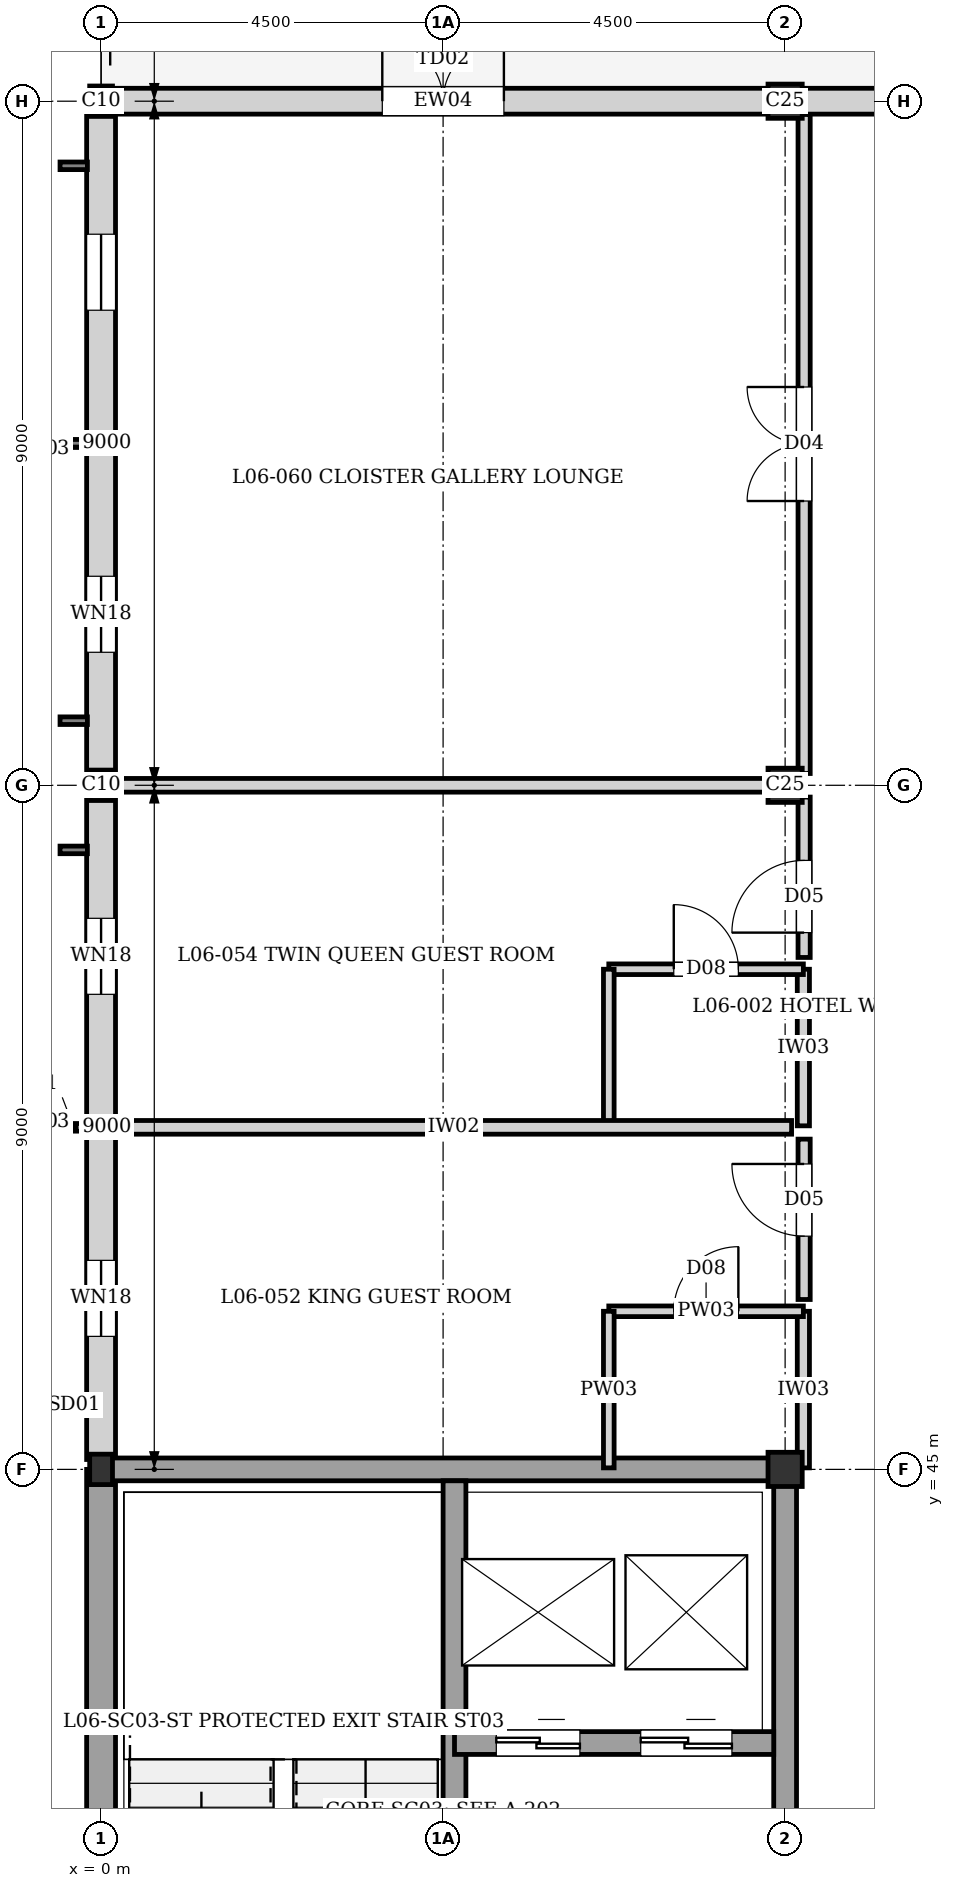
"""IFC4 building model, lengths in metres.
Left out: names, types, materials, properties, quantities, classifications, styles, units other than length and angle.
Written with IfcOpenShell. Run it as: python <this file> out.ifc"""

import sys

from ifc_helpers import new_model, si_unit, direction, frame, frame_2d, origin, origin_2d, place, context, subcontext, project, spatial, rectangle, i_section, extrude, element, fill, save


model = new_model("IFC4")
c1 = context("Model", 3, precision=1e-05, world=origin(), true_north=direction((0.0, 1.0)))
c2 = subcontext(c1, "Body", "Model", "MODEL_VIEW")
j1 = project(units=[si_unit("LENGTHUNIT", "METRE"), si_unit("PLANEANGLEUNIT", "RADIAN")], contexts=[c1])
p1 = place(None, origin())
s1 = spatial("IfcSite", under=j1, at=p1, CompositionType="ELEMENT")
p2 = place(p1, origin())
s2 = spatial("IfcBuilding", under=s1, at=p2, CompositionType="ELEMENT")
p3 = place(p2, frame((0.0, 0.0, 20.64)))
s3 = spatial("IfcBuildingStorey", under=s2, at=p3, CompositionType="ELEMENT", Elevation=20.64)
for number, where, z_axis, x_axis in (
    (1, (0.0, 45.0, 0.0), (0.0, 0.0, 1.0), (1.0, 0.0, 0.0)),
    (2, (0.0, 54.0, 0.0), (0.0, 0.0, 1.0), (1.0, 0.0, 0.0)),
    (3, (0.0, 63.0, 0.0), (0.0, 0.0, 1.0), (1.0, 0.0, 0.0)),
):
    element("IfcColumn", number, at=place(p3, frame(where, z_axis=z_axis, x_axis=x_axis)), inside=s3, PredefinedType="COLUMN", context=c2, shape_type="SweptSolid", body=[
        extrude(i_section(OverallWidth=0.3, OverallDepth=0.4, WebThickness=0.013, FlangeThickness=0.024, at=origin_2d()), origin(), (0.0, 0.0, 1.0), 3.04),
    ])
for number, where, z_axis, x_axis in (
    (4, (9.0, 45.0, 0.0), (0.0, 0.0, 1.0), (1.0, 0.0, 0.0)),
    (5, (9.0, 54.0, 0.0), (0.0, 0.0, 1.0), (1.0, 0.0, 0.0)),
    (6, (9.0, 63.0, 0.0), (0.0, 0.0, 1.0), (1.0, 0.0, 0.0)),
):
    element("IfcColumn", number, at=place(p3, frame(where, z_axis=z_axis, x_axis=x_axis)), inside=s3, PredefinedType="COLUMN", context=c2, shape_type="SweptSolid", body=[
        extrude(rectangle(XDim=0.45, YDim=0.45, at=origin_2d()), origin(), (0.0, 0.0, 1.0), 3.04),
    ])
p4 = place(p3, frame((0.0, 36.0, 0.0), z_axis=(0.0, 0.0, 1.0), x_axis=(0.0, 1.0, 0.0)))
e7 = element("IfcWall", 7, at=p4, inside=s3, PredefinedType="SOLIDWALL", context=c2, shape_type="SweptSolid", body=[
    extrude(rectangle(XDim=9.0, YDim=0.38, at=frame_2d((4.5, 0.0))), origin(), (0.0, 0.0, 1.0), 2.82),
])
p5 = place(p3, frame((0.0, 45.13, 0.0), z_axis=(0.0, 0.0, 1.0), x_axis=(0.0, 1.0, 0.0)))
e8 = element("IfcWall", 8, at=p5, inside=s3, PredefinedType="SOLIDWALL", context=c2, shape_type="SweptSolid", body=[
    extrude(rectangle(XDim=8.87, YDim=0.38, at=frame_2d((4.435, 0.0))), origin(), (0.0, 0.0, 1.0), 2.42),
])
p6 = place(p5, frame((1.62, 0.0, 0.35)))
e9 = element("IfcOpeningElement", 9, at=p6, cuts=e8, PredefinedType="OPENING", context=c2, shape_type="SweptSolid", body=[
    extrude(rectangle(XDim=1.0, YDim=1.6, at=frame_2d((0.5, 0.8))), frame((0.0, 0.2, 0.0), z_axis=(0.0, -1.0, 0.0), x_axis=(1.0, 0.0, 0.0)), (0.0, 0.0, 1.0), 0.4),
])
p7 = place(p5, frame((6.12, 0.0, 0.35)))
e10 = element("IfcOpeningElement", 10, at=p7, cuts=e8, PredefinedType="OPENING", context=c2, shape_type="SweptSolid", body=[
    extrude(rectangle(XDim=1.0, YDim=1.6, at=frame_2d((0.5, 0.8))), frame((0.0, 0.2, 0.0), z_axis=(0.0, -1.0, 0.0), x_axis=(1.0, 0.0, 0.0)), (0.0, 0.0, 1.0), 0.4),
])
p8 = place(p3, frame((0.0, 54.0, 0.0), z_axis=(0.0, 0.0, 1.0), x_axis=(0.0, 1.0, 0.0)))
e11 = element("IfcWall", 11, at=p8, inside=s3, PredefinedType="SOLIDWALL", context=c2, shape_type="SweptSolid", body=[
    extrude(rectangle(XDim=8.845, YDim=0.38, at=frame_2d((4.422, 0.0))), origin(), (0.0, 0.0, 1.0), 2.38),
])
p9 = place(p8, frame((1.75, 0.0, 0.35)))
e12 = element("IfcOpeningElement", 12, at=p9, cuts=e11, PredefinedType="OPENING", context=c2, shape_type="SweptSolid", body=[
    extrude(rectangle(XDim=1.0, YDim=1.6, at=frame_2d((0.5, 0.8))), frame((0.0, 0.2, 0.0), z_axis=(0.0, -1.0, 0.0), x_axis=(1.0, 0.0, 0.0)), (0.0, 0.0, 1.0), 0.4),
])
p10 = place(p8, frame((6.25, 0.0, 0.35)))
e13 = element("IfcOpeningElement", 13, at=p10, cuts=e11, PredefinedType="OPENING", context=c2, shape_type="SweptSolid", body=[
    extrude(rectangle(XDim=1.0, YDim=1.6, at=frame_2d((0.5, 0.8))), frame((0.0, 0.2, 0.0), z_axis=(0.0, -1.0, 0.0), x_axis=(1.0, 0.0, 0.0)), (0.0, 0.0, 1.0), 0.4),
])
p11 = place(p3, frame((0.0, 63.0, 0.0), z_axis=(0.0, 0.0, 1.0), x_axis=(1.0, 0.0, 0.0)))
e14 = element("IfcWall", 14, at=p11, inside=s3, PredefinedType="SOLIDWALL", context=c2, shape_type="SweptSolid", body=[
    extrude(rectangle(XDim=9.0, YDim=0.34, at=frame_2d((4.5, 0.0))), origin(), (0.0, 0.0, 1.0), 2.55),
])
p12 = place(p11, frame((3.7, 0.0, 0.0)))
e15 = element("IfcOpeningElement", 15, at=p12, cuts=e14, PredefinedType="OPENING", context=c2, shape_type="SweptSolid", body=[
    extrude(rectangle(XDim=1.6, YDim=2.25, at=frame_2d((0.8, 1.125))), frame((0.0, 0.18, 0.0), z_axis=(0.0, -1.0, 0.0), x_axis=(1.0, 0.0, 0.0)), (0.0, 0.0, 1.0), 0.36),
])
p13 = place(p3, frame((9.0, 63.0, 0.0), z_axis=(0.0, 0.0, 1.0), x_axis=(1.0, 0.0, 0.0)))
e16 = element("IfcWall", 16, at=p13, inside=s3, PredefinedType="SOLIDWALL", context=c2, shape_type="SweptSolid", body=[
    extrude(rectangle(XDim=9.0, YDim=0.34, at=frame_2d((4.5, 0.0))), origin(), (0.0, 0.0, 1.0), 2.48),
])
p14 = place(p13, frame((1.75, 0.0, 0.35)))
e17 = element("IfcOpeningElement", 17, at=p14, cuts=e16, PredefinedType="OPENING", context=c2, shape_type="SweptSolid", body=[
    extrude(rectangle(XDim=1.0, YDim=1.6, at=frame_2d((0.5, 0.8))), frame((0.0, 0.18, 0.0), z_axis=(0.0, -1.0, 0.0), x_axis=(1.0, 0.0, 0.0)), (0.0, 0.0, 1.0), 0.36),
])
p15 = place(p13, frame((6.25, 0.0, 0.35)))
e18 = element("IfcOpeningElement", 18, at=p15, cuts=e16, PredefinedType="OPENING", context=c2, shape_type="SweptSolid", body=[
    extrude(rectangle(XDim=1.0, YDim=1.6, at=frame_2d((0.5, 0.8))), frame((0.0, 0.18, 0.0), z_axis=(0.0, -1.0, 0.0), x_axis=(1.0, 0.0, 0.0)), (0.0, 0.0, 1.0), 0.36),
])
p16 = place(p3, frame((9.0, 36.0, 0.0), z_axis=(0.0, 0.0, 1.0), x_axis=(0.0, 1.0, 0.0)))
e19 = element("IfcWall", 19, at=p16, inside=s3, PredefinedType="SHEAR", context=c2, shape_type="SweptSolid", body=[
    extrude(rectangle(XDim=9.0, YDim=0.3, at=frame_2d((4.5, 0.0))), origin(), (0.0, 0.0, 1.0), 2.82),
])
p17 = place(p16, frame((2.05, 0.0, 0.0)))
e20 = element("IfcOpeningElement", 20, at=p17, cuts=e19, PredefinedType="OPENING", context=c2, shape_type="SweptSolid", body=[
    extrude(rectangle(XDim=1.4, YDim=2.02, at=frame_2d((0.7, 1.01))), frame((0.0, 0.16, 0.0), z_axis=(0.0, -1.0, 0.0), x_axis=(1.0, 0.0, 0.0)), (0.0, 0.0, 1.0), 0.32),
])
p18 = place(p3, frame((0.0, 45.0, 0.0), z_axis=(0.0, 0.0, 1.0), x_axis=(1.0, 0.0, 0.0)))
e21 = element("IfcWall", 21, at=p18, inside=s3, PredefinedType="SHEAR", context=c2, shape_type="SweptSolid", body=[
    extrude(rectangle(XDim=9.0, YDim=0.3, at=frame_2d((4.5, 0.0))), origin(), (0.0, 0.0, 1.0), 2.82),
])
p19 = place(p3, frame((4.65, 36.15, 0.0), z_axis=(0.0, 0.0, 1.0), x_axis=(0.0, 1.0, 0.0)))
e22 = element("IfcWall", 22, at=p19, inside=s3, PredefinedType="SHEAR", context=c2, shape_type="SweptSolid", body=[
    extrude(rectangle(XDim=8.7, YDim=0.3, at=frame_2d((4.35, 0.0))), origin(), (0.0, 0.0, 1.0), 2.82),
])
p20 = place(p19, frame((0.35, 0.0, 0.0)))
e23 = element("IfcOpeningElement", 23, at=p20, cuts=e22, PredefinedType="OPENING", context=c2, shape_type="SweptSolid", body=[
    extrude(rectangle(XDim=1.4, YDim=2.02, at=frame_2d((0.7, 1.01))), frame((0.0, 0.16, 0.0), z_axis=(0.0, -1.0, 0.0), x_axis=(1.0, 0.0, 0.0)), (0.0, 0.0, 1.0), 0.32),
])
p21 = place(p3, frame((4.65, 41.4, 0.0), z_axis=(0.0, 0.0, 1.0), x_axis=(1.0, 0.0, 0.0)))
e24 = element("IfcWall", 24, at=p21, inside=s3, PredefinedType="SHEAR", context=c2, shape_type="SweptSolid", body=[
    extrude(rectangle(XDim=4.2, YDim=0.3, at=frame_2d((2.1, 0.0))), origin(), (0.0, 0.0, 1.0), 2.82),
])
p22 = place(p21, frame((0.55, 0.0, 0.0)))
e25 = element("IfcOpeningElement", 25, at=p22, cuts=e24, PredefinedType="OPENING", context=c2, shape_type="SweptSolid", body=[
    extrude(rectangle(XDim=1.1, YDim=2.1, at=frame_2d((0.55, 1.05))), frame((0.0, 0.16, 0.0), z_axis=(0.0, -1.0, 0.0), x_axis=(1.0, 0.0, 0.0)), (0.0, 0.0, 1.0), 0.32),
])
p23 = place(p21, frame((2.45, 0.0, 0.0)))
e26 = element("IfcOpeningElement", 26, at=p23, cuts=e24, PredefinedType="OPENING", context=c2, shape_type="SweptSolid", body=[
    extrude(rectangle(XDim=1.2, YDim=2.2, at=frame_2d((0.6, 1.1))), frame((0.0, 0.16, 0.0), z_axis=(0.0, -1.0, 0.0), x_axis=(1.0, 0.0, 0.0)), (0.0, 0.0, 1.0), 0.32),
])
p24 = place(p3, frame((9.24, 45.02, 0.0), z_axis=(0.0, 0.0, 1.0), x_axis=(0.0, 1.0, 0.0)))
e27 = element("IfcWall", 27, at=p24, inside=s3, PredefinedType="PARTITIONING", context=c2, shape_type="SweptSolid", body=[
    extrude(rectangle(XDim=2.06, YDim=0.16, at=frame_2d((1.03, 0.0))), origin(), (0.0, 0.0, 1.0), 2.82),
])
p25 = place(p3, frame((6.68, 47.08, 0.0), z_axis=(0.0, 0.0, 1.0), x_axis=(1.0, 0.0, 0.0)))
e28 = element("IfcWall", 28, at=p25, inside=s3, PredefinedType="PLUMBINGWALL", context=c2, shape_type="SweptSolid", body=[
    extrude(rectangle(XDim=2.56, YDim=0.14, at=frame_2d((1.28, 0.0))), origin(), (0.0, 0.0, 1.0), 2.82),
])
p26 = place(p25, frame((0.855, 0.0, 0.0)))
e29 = element("IfcOpeningElement", 29, at=p26, cuts=e28, PredefinedType="OPENING", context=c2, shape_type="SweptSolid", body=[
    extrude(rectangle(XDim=0.85, YDim=2.04, at=frame_2d((0.425, 1.02))), frame((0.0, 0.08, 0.0), z_axis=(0.0, -1.0, 0.0), x_axis=(1.0, 0.0, 0.0)), (0.0, 0.0, 1.0), 0.16),
])
p27 = place(p3, frame((6.68, 45.02, 0.0), z_axis=(0.0, 0.0, 1.0), x_axis=(0.0, 1.0, 0.0)))
e30 = element("IfcWall", 30, at=p27, inside=s3, PredefinedType="PLUMBINGWALL", context=c2, shape_type="SweptSolid", body=[
    extrude(rectangle(XDim=2.06, YDim=0.14, at=frame_2d((1.03, 0.0))), origin(), (0.0, 0.0, 1.0), 2.82),
])
p28 = place(p3, frame((9.24, 49.52, 0.0), z_axis=(0.0, 0.0, 1.0), x_axis=(0.0, 1.0, 0.0)))
e31 = element("IfcWall", 31, at=p28, inside=s3, PredefinedType="PARTITIONING", context=c2, shape_type="SweptSolid", body=[
    extrude(rectangle(XDim=2.06, YDim=0.16, at=frame_2d((1.03, 0.0))), origin(), (0.0, 0.0, 1.0), 2.82),
])
p29 = place(p3, frame((6.68, 51.58, 0.0), z_axis=(0.0, 0.0, 1.0), x_axis=(1.0, 0.0, 0.0)))
e32 = element("IfcWall", 32, at=p29, inside=s3, PredefinedType="PLUMBINGWALL", context=c2, shape_type="SweptSolid", body=[
    extrude(rectangle(XDim=2.56, YDim=0.14, at=frame_2d((1.28, 0.0))), origin(), (0.0, 0.0, 1.0), 2.82),
])
p30 = place(p29, frame((0.855, 0.0, 0.0)))
e33 = element("IfcOpeningElement", 33, at=p30, cuts=e32, PredefinedType="OPENING", context=c2, shape_type="SweptSolid", body=[
    extrude(rectangle(XDim=0.85, YDim=2.04, at=frame_2d((0.425, 1.02))), frame((0.0, 0.08, 0.0), z_axis=(0.0, -1.0, 0.0), x_axis=(1.0, 0.0, 0.0)), (0.0, 0.0, 1.0), 0.16),
])
p31 = place(p3, frame((6.68, 49.52, 0.0), z_axis=(0.0, 0.0, 1.0), x_axis=(0.0, 1.0, 0.0)))
e34 = element("IfcWall", 34, at=p31, inside=s3, PredefinedType="PLUMBINGWALL", context=c2, shape_type="SweptSolid", body=[
    extrude(rectangle(XDim=2.06, YDim=0.14, at=frame_2d((1.03, 0.0))), origin(), (0.0, 0.0, 1.0), 2.82),
])
p32 = place(p3, frame((0.195, 49.5, 0.0), z_axis=(0.0, 0.0, 1.0), x_axis=(1.0, 0.0, 0.0)))
e35 = element("IfcWall", 35, at=p32, inside=s3, PredefinedType="PARTITIONING", context=c2, shape_type="SweptSolid", body=[
    extrude(rectangle(XDim=8.89, YDim=0.18, at=frame_2d((4.445, 0.0))), origin(), (0.0, 0.0, 1.0), 2.82),
])
p33 = place(p3, frame((0.195, 54.0, 0.0), z_axis=(0.0, 0.0, 1.0), x_axis=(1.0, 0.0, 0.0)))
e36 = element("IfcWall", 36, at=p33, inside=s3, PredefinedType="PARTITIONING", context=c2, shape_type="SweptSolid", body=[
    extrude(rectangle(XDim=9.065, YDim=0.18, at=frame_2d((4.532, 0.0))), origin(), (0.0, 0.0, 1.0), 2.33),
])
p34 = place(p3, frame((9.25, 47.235, 0.0), z_axis=(0.0, 0.0, 1.0), x_axis=(0.0, 1.0, 0.0)))
e37 = element("IfcWall", 37, at=p34, inside=s3, PredefinedType="PARTITIONING", context=c2, shape_type="SweptSolid", body=[
    extrude(rectangle(XDim=2.11, YDim=0.16, at=frame_2d((1.055, 0.0))), origin(), (0.0, 0.0, 1.0), 2.82),
])
p35 = place(p34, frame((0.833, 0.0, 0.0)))
e38 = element("IfcOpeningElement", 38, at=p35, cuts=e37, PredefinedType="OPENING", context=c2, shape_type="SweptSolid", body=[
    extrude(rectangle(XDim=0.95, YDim=2.15, at=frame_2d((0.475, 1.075))), frame((0.0, 0.09, 0.0), z_axis=(0.0, -1.0, 0.0), x_axis=(1.0, 0.0, 0.0)), (0.0, 0.0, 1.0), 0.18),
])
p36 = place(p3, frame((9.25, 51.735, 0.0), z_axis=(0.0, 0.0, 1.0), x_axis=(0.0, 1.0, 0.0)))
e39 = element("IfcWall", 39, at=p36, inside=s3, PredefinedType="PARTITIONING", context=c2, shape_type="SweptSolid", body=[
    extrude(rectangle(XDim=2.11, YDim=0.16, at=frame_2d((1.055, 0.0))), origin(), (0.0, 0.0, 1.0), 2.82),
])
p37 = place(p36, frame((0.327, 0.0, 0.0)))
e40 = element("IfcOpeningElement", 40, at=p37, cuts=e39, PredefinedType="OPENING", context=c2, shape_type="SweptSolid", body=[
    extrude(rectangle(XDim=0.95, YDim=2.15, at=frame_2d((0.475, 1.075))), frame((0.0, 0.09, 0.0), z_axis=(0.0, -1.0, 0.0), x_axis=(1.0, 0.0, 0.0)), (0.0, 0.0, 1.0), 0.18),
])
p38 = place(p3, frame((9.25, 54.155, 0.0), z_axis=(0.0, 0.0, 1.0), x_axis=(0.0, 1.0, 0.0)))
e41 = element("IfcWall", 41, at=p38, inside=s3, PredefinedType="PARTITIONING", context=c2, shape_type="SweptSolid", body=[
    extrude(rectangle(XDim=8.67, YDim=0.16, at=frame_2d((4.335, 0.0))), origin(), (0.0, 0.0, 1.0), 2.82),
])
p39 = place(p38, frame((3.585, 0.0, 0.0)))
e42 = element("IfcOpeningElement", 42, at=p39, cuts=e41, PredefinedType="OPENING", context=c2, shape_type="SweptSolid", body=[
    extrude(rectangle(XDim=1.5, YDim=2.1, at=frame_2d((0.75, 1.05))), frame((0.0, 0.09, 0.0), z_axis=(0.0, -1.0, 0.0), x_axis=(1.0, 0.0, 0.0)), (0.0, 0.0, 1.0), 0.18),
])
p40 = place(p6, origin())
e43 = element("IfcWindow", 43, at=p40, inside=s3, PartitioningType="SINGLE_PANEL", PredefinedType="WINDOW", context=c2, shape_type="SweptSolid", body=[
    extrude(rectangle(XDim=1.0, YDim=1.6, at=frame_2d((0.5, 0.8))), frame((0.0, 0.03, 0.0), z_axis=(0.0, -1.0, 0.0), x_axis=(1.0, 0.0, 0.0)), (0.0, 0.0, 1.0), 0.06),
])
fill(e9, e43)
p41 = place(p7, origin())
e44 = element("IfcWindow", 44, at=p41, inside=s3, PartitioningType="SINGLE_PANEL", PredefinedType="WINDOW", context=c2, shape_type="SweptSolid", body=[
    extrude(rectangle(XDim=1.0, YDim=1.6, at=frame_2d((0.5, 0.8))), frame((0.0, 0.03, 0.0), z_axis=(0.0, -1.0, 0.0), x_axis=(1.0, 0.0, 0.0)), (0.0, 0.0, 1.0), 0.06),
])
fill(e10, e44)
p42 = place(p9, origin())
e45 = element("IfcWindow", 45, at=p42, inside=s3, PartitioningType="SINGLE_PANEL", PredefinedType="WINDOW", context=c2, shape_type="SweptSolid", body=[
    extrude(rectangle(XDim=1.0, YDim=1.6, at=frame_2d((0.5, 0.8))), frame((0.0, 0.03, 0.0), z_axis=(0.0, -1.0, 0.0), x_axis=(1.0, 0.0, 0.0)), (0.0, 0.0, 1.0), 0.06),
])
fill(e12, e45)
p43 = place(p10, origin())
e46 = element("IfcWindow", 46, at=p43, inside=s3, PartitioningType="SINGLE_PANEL", PredefinedType="WINDOW", context=c2, shape_type="SweptSolid", body=[
    extrude(rectangle(XDim=1.0, YDim=1.6, at=frame_2d((0.5, 0.8))), frame((0.0, 0.03, 0.0), z_axis=(0.0, -1.0, 0.0), x_axis=(1.0, 0.0, 0.0)), (0.0, 0.0, 1.0), 0.06),
])
fill(e13, e46)
p44 = place(p12, origin())
e47 = element("IfcDoor", 47, at=p44, inside=s3, OperationType="DOUBLE_DOOR_SINGLE_SWING", PredefinedType="DOOR", context=c2, shape_type="SweptSolid", body=[
    extrude(rectangle(XDim=1.6, YDim=2.25, at=frame_2d((0.8, 1.125))), frame((0.0, 0.025, 0.0), z_axis=(0.0, -1.0, 0.0), x_axis=(1.0, 0.0, 0.0)), (0.0, 0.0, 1.0), 0.05),
])
fill(e15, e47)
p45 = place(p22, origin())
e48 = element("IfcDoor", 48, at=p45, inside=s3, OperationType="DOUBLE_DOOR_SLIDING", PredefinedType="DOOR", context=c2, shape_type="SweptSolid", body=[
    extrude(rectangle(XDim=1.1, YDim=2.1, at=frame_2d((0.55, 1.05))), frame((0.0, 0.025, 0.0), z_axis=(0.0, -1.0, 0.0), x_axis=(1.0, 0.0, 0.0)), (0.0, 0.0, 1.0), 0.05),
])
fill(e25, e48)
p46 = place(p23, origin())
e49 = element("IfcDoor", 49, at=p46, inside=s3, OperationType="DOUBLE_DOOR_SLIDING", PredefinedType="DOOR", context=c2, shape_type="SweptSolid", body=[
    extrude(rectangle(XDim=1.2, YDim=2.2, at=frame_2d((0.6, 1.1))), frame((0.0, 0.025, 0.0), z_axis=(0.0, -1.0, 0.0), x_axis=(1.0, 0.0, 0.0)), (0.0, 0.0, 1.0), 0.05),
])
fill(e26, e49)
p47 = place(p26, origin())
e50 = element("IfcDoor", 50, at=p47, inside=s3, OperationType="SINGLE_SWING_RIGHT", PredefinedType="DOOR", context=c2, shape_type="SweptSolid", body=[
    extrude(rectangle(XDim=0.85, YDim=2.04, at=frame_2d((0.425, 1.02))), frame((0.0, 0.025, 0.0), z_axis=(0.0, -1.0, 0.0), x_axis=(1.0, 0.0, 0.0)), (0.0, 0.0, 1.0), 0.05),
])
fill(e29, e50)
p48 = place(p30, origin())
e51 = element("IfcDoor", 51, at=p48, inside=s3, OperationType="SINGLE_SWING_LEFT", PredefinedType="DOOR", context=c2, shape_type="SweptSolid", body=[
    extrude(rectangle(XDim=0.85, YDim=2.04, at=frame_2d((0.425, 1.02))), frame((0.0, 0.025, 0.0), z_axis=(0.0, -1.0, 0.0), x_axis=(1.0, 0.0, 0.0)), (0.0, 0.0, 1.0), 0.05),
])
fill(e33, e51)
p49 = place(p35, origin())
e52 = element("IfcDoor", 52, at=p49, inside=s3, OperationType="SINGLE_SWING_RIGHT", PredefinedType="DOOR", context=c2, shape_type="SweptSolid", body=[
    extrude(rectangle(XDim=0.95, YDim=2.15, at=frame_2d((0.475, 1.075))), frame((0.0, 0.025, 0.0), z_axis=(0.0, -1.0, 0.0), x_axis=(1.0, 0.0, 0.0)), (0.0, 0.0, 1.0), 0.05),
])
fill(e38, e52)
p50 = place(p37, origin())
e53 = element("IfcDoor", 53, at=p50, inside=s3, OperationType="SINGLE_SWING_LEFT", PredefinedType="DOOR", context=c2, shape_type="SweptSolid", body=[
    extrude(rectangle(XDim=0.95, YDim=2.15, at=frame_2d((0.475, 1.075))), frame((0.0, 0.025, 0.0), z_axis=(0.0, -1.0, 0.0), x_axis=(1.0, 0.0, 0.0)), (0.0, 0.0, 1.0), 0.05),
])
fill(e40, e53)
p51 = place(p39, origin())
e54 = element("IfcDoor", 54, at=p51, inside=s3, OperationType="DOUBLE_DOOR_SINGLE_SWING", PredefinedType="DOOR", context=c2, shape_type="SweptSolid", body=[
    extrude(rectangle(XDim=1.5, YDim=2.1, at=frame_2d((0.75, 1.05))), frame((0.0, 0.025, 0.0), z_axis=(0.0, -1.0, 0.0), x_axis=(1.0, 0.0, 0.0)), (0.0, 0.0, 1.0), 0.05),
])
fill(e42, e54)
save(model, sys.argv[1])
